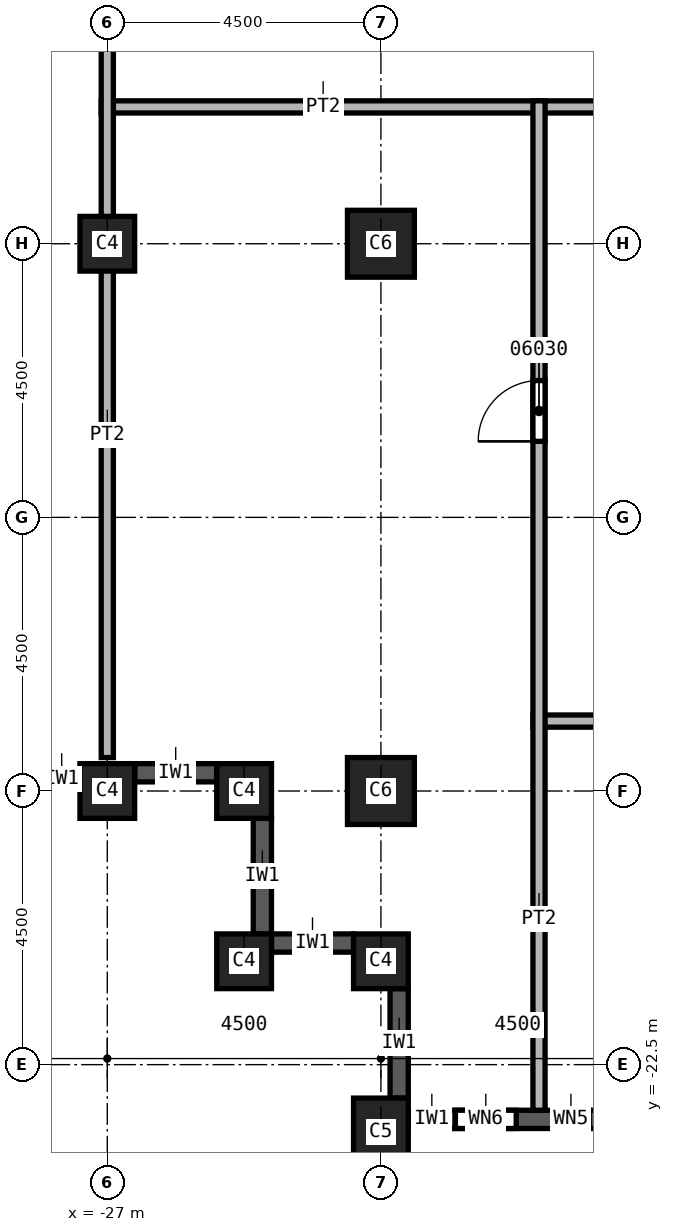
"""IFC4 building model, lengths in metres.
Left out: names, types, materials, properties, quantities, classifications, styles, units other than length and angle.
Written with IfcOpenShell. Run it as: python <this file> out.ifc"""

import sys

from ifc_helpers import new_model, si_unit, direction, frame, frame_2d, origin, origin_2d, place, context, subcontext, project, spatial, rectangle, extrude, element, fill, save


model = new_model("IFC4")
c1 = context("Model", 3, precision=1e-05, world=origin(), true_north=direction((0.0, 1.0)))
c2 = subcontext(c1, "Body", "Model", "MODEL_VIEW")
j1 = project(units=[si_unit("LENGTHUNIT", "METRE"), si_unit("PLANEANGLEUNIT", "RADIAN")], contexts=[c1])
p1 = place(None, origin())
s1 = spatial("IfcSite", under=j1, at=p1, CompositionType="ELEMENT")
p2 = place(p1, origin())
s2 = spatial("IfcBuilding", under=s1, at=p2, CompositionType="ELEMENT")
p3 = place(p2, frame((0.0, 0.0, 126.0)))
s3 = spatial("IfcBuildingStorey", under=s2, at=p3, CompositionType="ELEMENT", Elevation=126.0)
for number, where, z_axis, x_axis in (
    (1, (-22.5, -9.0, 0.0), (0.0, 0.0, 1.0), (1.0, 0.0, 0.0)),
    (2, (-22.5, -18.0, 0.0), (0.0, 0.0, 1.0), (1.0, 0.0, 0.0)),
):
    element("IfcColumn", number, at=place(p3, frame(where, z_axis=z_axis, x_axis=x_axis)), inside=s3, PredefinedType="COLUMN", context=c2, shape_type="SweptSolid", body=[
        extrude(rectangle(XDim=1.1, YDim=1.1, at=origin_2d()), origin(), (0.0, 0.0, 1.0), 3.7),
    ])
p4 = place(p3, frame((-22.5, -23.6, 0.0), z_axis=(0.0, 0.0, 1.0), x_axis=(1.0, 0.0, 0.0)))
e3 = element("IfcColumn", 3, at=p4, inside=s3, PredefinedType="COLUMN", context=c2, shape_type="SweptSolid", body=[
    extrude(rectangle(XDim=0.9, YDim=1.1, at=origin_2d()), origin(), (0.0, 0.0, 1.0), 3.7),
])
for number, where, z_axis, x_axis in (
    (4, (-27.0, -9.0, 0.0), (0.0, 0.0, 1.0), (1.0, 0.0, 0.0)),
    (5, (-27.0, -18.0, 0.0), (0.0, 0.0, 1.0), (1.0, 0.0, 0.0)),
    (6, (-22.5, -20.8, 0.0), (0.0, 0.0, 1.0), (1.0, 0.0, 0.0)),
    (7, (-24.75, -20.8, 0.0), (0.0, 0.0, 1.0), (1.0, 0.0, 0.0)),
    (8, (-24.75, -18.0, 0.0), (0.0, 0.0, 1.0), (1.0, 0.0, 0.0)),
):
    element("IfcColumn", number, at=place(p3, frame(where, z_axis=z_axis, x_axis=x_axis)), inside=s3, PredefinedType="COLUMN", context=c2, shape_type="SweptSolid", body=[
        extrude(rectangle(XDim=0.9, YDim=0.9, at=origin_2d()), origin(), (0.0, 0.0, 1.0), 3.7),
    ])
p5 = place(p3, frame((-31.05, -17.8, 0.0), z_axis=(0.0, 0.0, 1.0), x_axis=(1.0, 0.0, 0.0)))
e9 = element("IfcWall", 9, at=p5, inside=s3, PredefinedType="SOLIDWALL", context=c2, shape_type="SweptSolid", body=[
    extrude(rectangle(XDim=3.6, YDim=0.3, at=frame_2d((1.8, 0.0))), origin(), (0.0, 0.0, 1.0), 3.1),
])
p6 = place(p5, frame((0.6, 0.0, 0.8)))
e10 = element("IfcOpeningElement", 10, at=p6, cuts=e9, PredefinedType="OPENING", context=c2, shape_type="SweptSolid", body=[
    extrude(rectangle(XDim=2.4, YDim=1.95, at=frame_2d((1.2, 0.975))), frame((0.0, 0.15, 0.0), z_axis=(0.0, -1.0, 0.0), x_axis=(1.0, 0.0, 0.0)), (0.0, 0.0, 1.0), 0.3),
])
p7 = place(p3, frame((-26.55, -17.7, 0.0), z_axis=(0.0, 0.0, 1.0), x_axis=(1.0, 0.0, 0.0)))
e11 = element("IfcWall", 11, at=p7, inside=s3, PredefinedType="SOLIDWALL", context=c2, shape_type="SweptSolid", body=[
    extrude(rectangle(XDim=1.35, YDim=0.3, at=frame_2d((0.675, 0.0))), origin(), (0.0, 0.0, 1.0), 3.1),
])
p8 = place(p3, frame((-24.45, -18.45, 0.0), z_axis=(0.0, 0.0, 1.0), x_axis=(0.0, -1.0, 0.0)))
e12 = element("IfcWall", 12, at=p8, inside=s3, PredefinedType="SOLIDWALL", context=c2, shape_type="SweptSolid", body=[
    extrude(rectangle(XDim=1.9, YDim=0.3, at=frame_2d((0.95, 0.0))), origin(), (0.0, 0.0, 1.0), 3.1),
])
p9 = place(p3, frame((-24.3, -20.5, 0.0), z_axis=(0.0, 0.0, 1.0), x_axis=(1.0, 0.0, 0.0)))
e13 = element("IfcWall", 13, at=p9, inside=s3, PredefinedType="SOLIDWALL", context=c2, shape_type="SweptSolid", body=[
    extrude(rectangle(XDim=1.35, YDim=0.3, at=frame_2d((0.675, 0.0))), origin(), (0.0, 0.0, 1.0), 3.1),
])
p10 = place(p3, frame((-22.2, -21.25, 0.0), z_axis=(0.0, 0.0, 1.0), x_axis=(0.0, -1.0, 0.0)))
e14 = element("IfcWall", 14, at=p10, inside=s3, PredefinedType="SOLIDWALL", context=c2, shape_type="SweptSolid", body=[
    extrude(rectangle(XDim=1.8, YDim=0.3, at=frame_2d((0.9, 0.0))), origin(), (0.0, 0.0, 1.0), 3.1),
])
p11 = place(p3, frame((-22.05, -23.4, 0.0), z_axis=(0.0, 0.0, 1.0), x_axis=(1.0, 0.0, 0.0)))
e15 = element("IfcWall", 15, at=p11, inside=s3, PredefinedType="SOLIDWALL", context=c2, shape_type="SweptSolid", body=[
    extrude(rectangle(XDim=3.6, YDim=0.3, at=frame_2d((1.8, 0.0))), origin(), (0.0, 0.0, 1.0), 3.1),
])
p12 = place(p11, frame((0.775, 0.0, 0.8)))
e16 = element("IfcOpeningElement", 16, at=p12, cuts=e15, PredefinedType="OPENING", context=c2, shape_type="SweptSolid", body=[
    extrude(rectangle(XDim=1.0, YDim=1.95, at=frame_2d((0.5, 0.975))), frame((0.0, 0.15, 0.0), z_axis=(0.0, -1.0, 0.0), x_axis=(1.0, 0.0, 0.0)), (0.0, 0.0, 1.0), 0.3),
])
p13 = place(p11, frame((2.375, 0.0, 0.8)))
e17 = element("IfcOpeningElement", 17, at=p13, cuts=e15, PredefinedType="OPENING", context=c2, shape_type="SweptSolid", body=[
    extrude(rectangle(XDim=0.6, YDim=1.95, at=frame_2d((0.3, 0.975))), frame((0.0, 0.15, 0.0), z_axis=(0.0, -1.0, 0.0), x_axis=(1.0, 0.0, 0.0)), (0.0, 0.0, 1.0), 0.3),
])
p14 = place(p3, frame((-27.1, -6.75, 0.0), z_axis=(0.0, 0.0, 1.0), x_axis=(1.0, 0.0, 0.0)))
e18 = element("IfcWall", 18, at=p14, inside=s3, PredefinedType="PARTITIONING", context=c2, shape_type="SweptSolid", body=[
    extrude(rectangle(XDim=11.7, YDim=0.2, at=frame_2d((5.85, 0.0))), origin(), (0.0, 0.0, 1.0), 3.7),
])
p15 = place(p3, frame((-27.0, -17.45, 0.0), z_axis=(0.0, 0.0, 1.0), x_axis=(0.0, 1.0, 0.0)))
e19 = element("IfcWall", 19, at=p15, inside=s3, PredefinedType="PARTITIONING", context=c2, shape_type="SweptSolid", body=[
    extrude(rectangle(XDim=18.2, YDim=0.2, at=frame_2d((9.1, 0.0))), origin(), (0.0, 0.0, 1.0), 3.7),
])
p16 = place(p3, frame((-20.0, -16.85, 0.0), z_axis=(0.0, 0.0, 1.0), x_axis=(1.0, 0.0, 0.0)))
e20 = element("IfcWall", 20, at=p16, inside=s3, PredefinedType="PARTITIONING", context=c2, shape_type="SweptSolid", body=[
    extrude(rectangle(XDim=4.6, YDim=0.2, at=frame_2d((2.3, 0.0))), origin(), (0.0, 0.0, 1.0), 3.7),
])
p17 = place(p3, frame((-19.9, -23.25, 0.0), z_axis=(0.0, 0.0, 1.0), x_axis=(0.0, 1.0, 0.0)))
e21 = element("IfcWall", 21, at=p17, inside=s3, PredefinedType="PARTITIONING", context=c2, shape_type="SweptSolid", body=[
    extrude(rectangle(XDim=16.6, YDim=0.2, at=frame_2d((8.3, 0.0))), origin(), (0.0, 0.0, 1.0), 3.7),
])
p18 = place(p17, frame((11.0, 0.0, 0.0)))
e22 = element("IfcOpeningElement", 22, at=p18, cuts=e21, PredefinedType="OPENING", context=c2, shape_type="SweptSolid", body=[
    extrude(rectangle(XDim=1.0, YDim=2.1, at=frame_2d((0.5, 1.05))), frame((0.0, 0.1, 0.0), z_axis=(0.0, -1.0, 0.0), x_axis=(1.0, 0.0, 0.0)), (0.0, 0.0, 1.0), 0.2),
])
p19 = place(p18, origin())
e23 = element("IfcDoor", 23, at=p19, inside=s3, OperationType="SINGLE_SWING_LEFT", PredefinedType="DOOR", context=c2, shape_type="SweptSolid", body=[
    extrude(rectangle(XDim=1.0, YDim=2.1, at=frame_2d((0.5, 1.05))), frame((0.0, 0.025, 0.0), z_axis=(0.0, -1.0, 0.0), x_axis=(1.0, 0.0, 0.0)), (0.0, 0.0, 1.0), 0.05),
])
fill(e22, e23)
p20 = place(p12, origin())
e24 = element("IfcWindow", 24, at=p20, inside=s3, PartitioningType="SINGLE_PANEL", PredefinedType="WINDOW", context=c2, shape_type="SweptSolid", body=[
    extrude(rectangle(XDim=1.0, YDim=1.95, at=frame_2d((0.5, 0.975))), frame((0.0, 0.03, 0.0), z_axis=(0.0, -1.0, 0.0), x_axis=(1.0, 0.0, 0.0)), (0.0, 0.0, 1.0), 0.06),
])
fill(e16, e24)
p21 = place(p13, origin())
e25 = element("IfcWindow", 25, at=p21, inside=s3, PartitioningType="SINGLE_PANEL", PredefinedType="WINDOW", context=c2, shape_type="SweptSolid", body=[
    extrude(rectangle(XDim=0.6, YDim=1.95, at=frame_2d((0.3, 0.975))), frame((0.0, 0.03, 0.0), z_axis=(0.0, -1.0, 0.0), x_axis=(1.0, 0.0, 0.0)), (0.0, 0.0, 1.0), 0.06),
])
fill(e17, e25)
save(model, sys.argv[1])
